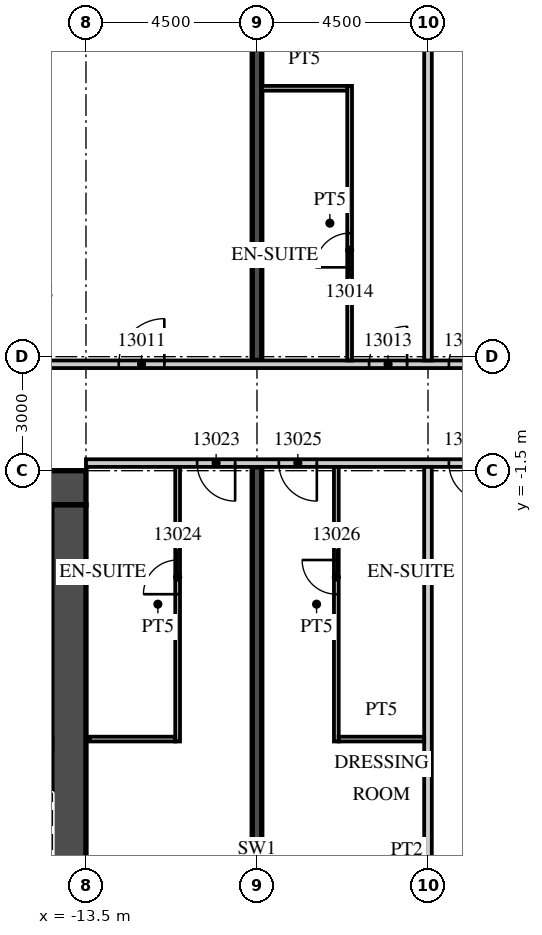
"""IFC4 building model, lengths in metres.
Left out: names, types, materials, properties, quantities, classifications, styles, units other than length and angle.
Written with IfcOpenShell. Run it as: python <this file> out.ifc"""

import sys

from ifc_helpers import new_model, si_unit, direction, frame, frame_2d, origin, place, context, subcontext, project, spatial, rectangle, extrude, element, fill, save


model = new_model("IFC4")
c1 = context("Model", 3, precision=1e-05, world=origin(), true_north=direction((0.0, 1.0)))
c2 = subcontext(c1, "Body", "Model", "MODEL_VIEW")
j1 = project(units=[si_unit("LENGTHUNIT", "METRE"), si_unit("PLANEANGLEUNIT", "RADIAN")], contexts=[c1])
p1 = place(None, origin())
s1 = spatial("IfcSite", under=j1, at=p1, CompositionType="ELEMENT")
p2 = place(p1, origin())
s2 = spatial("IfcBuilding", under=s1, at=p2, CompositionType="ELEMENT")
p3 = place(p2, frame((0.0, 0.0, 73.2)))
s3 = spatial("IfcBuildingStorey", under=s2, at=p3, CompositionType="ELEMENT", Elevation=73.2)
for number, where, z_axis, x_axis in (
    (1, (-9.0, -21.54, 0.0), (0.0, 0.0, 1.0), (0.0, 1.0, 0.0)),
    (2, (-9.0, 1.4, 0.0), (0.0, 0.0, 1.0), (0.0, 1.0, 0.0)),
):
    element("IfcWall", number, at=place(p3, frame(where, z_axis=z_axis, x_axis=x_axis)), inside=s3, PredefinedType="SHEAR", context=c2, shape_type="SweptSolid", body=[
        extrude(rectangle(XDim=20.14, YDim=0.25, at=frame_2d((10.07, 0.0))), origin(), (0.0, 0.0, 1.0), 3.3),
    ])
p4 = place(p3, frame((-44.55, 1.3, 0.0), z_axis=(0.0, 0.0, 1.0), x_axis=(1.0, 0.0, 0.0)))
e3 = element("IfcWall", 3, at=p4, inside=s3, PredefinedType="PARTITIONING", context=c2, shape_type="SweptSolid", body=[
    extrude(rectangle(XDim=58.05, YDim=0.2, at=frame_2d((29.025, 0.0))), origin(), (0.0, 0.0, 1.0), 3.02),
])
p5 = place(p4, frame((0.525, 0.0, 0.0)))
e4 = element("IfcOpeningElement", 4, at=p5, cuts=e3, PredefinedType="OPENING", context=c2, shape_type="SweptSolid", body=[
    extrude(rectangle(XDim=1.0, YDim=2.1, at=frame_2d((0.5, 1.05))), frame((0.0, 0.11, 0.0), z_axis=(0.0, -1.0, 0.0), x_axis=(1.0, 0.0, 0.0)), (0.0, 0.0, 1.0), 0.22),
])
p6 = place(p4, frame((6.975, 0.0, 0.0)))
e5 = element("IfcOpeningElement", 5, at=p6, cuts=e3, PredefinedType="OPENING", context=c2, shape_type="SweptSolid", body=[
    extrude(rectangle(XDim=1.0, YDim=2.1, at=frame_2d((0.5, 1.05))), frame((0.0, 0.11, 0.0), z_axis=(0.0, -1.0, 0.0), x_axis=(1.0, 0.0, 0.0)), (0.0, 0.0, 1.0), 0.22),
])
p7 = place(p4, frame((9.125, 0.0, 0.0)))
e6 = element("IfcOpeningElement", 6, at=p7, cuts=e3, PredefinedType="OPENING", context=c2, shape_type="SweptSolid", body=[
    extrude(rectangle(XDim=1.0, YDim=2.1, at=frame_2d((0.5, 1.05))), frame((0.0, 0.11, 0.0), z_axis=(0.0, -1.0, 0.0), x_axis=(1.0, 0.0, 0.0)), (0.0, 0.0, 1.0), 0.22),
])
p8 = place(p4, frame((13.6, 0.0, 0.0)))
e7 = element("IfcOpeningElement", 7, at=p8, cuts=e3, PredefinedType="OPENING", context=c2, shape_type="SweptSolid", body=[
    extrude(rectangle(XDim=1.0, YDim=2.1, at=frame_2d((0.5, 1.05))), frame((0.0, 0.11, 0.0), z_axis=(0.0, -1.0, 0.0), x_axis=(1.0, 0.0, 0.0)), (0.0, 0.0, 1.0), 0.22),
])
p9 = place(p4, frame((19.987, 0.0, 0.0)))
e8 = element("IfcOpeningElement", 8, at=p9, cuts=e3, PredefinedType="OPENING", context=c2, shape_type="SweptSolid", body=[
    extrude(rectangle(XDim=1.2, YDim=2.1, at=frame_2d((0.6, 1.05))), frame((0.0, 0.11, 0.0), z_axis=(0.0, -1.0, 0.0), x_axis=(1.0, 0.0, 0.0)), (0.0, 0.0, 1.0), 0.22),
])
p10 = place(p4, frame((31.912, 0.0, 0.0)))
e9 = element("IfcOpeningElement", 9, at=p10, cuts=e3, PredefinedType="OPENING", context=c2, shape_type="SweptSolid", body=[
    extrude(rectangle(XDim=1.2, YDim=2.1, at=frame_2d((0.6, 1.05))), frame((0.0, 0.11, 0.0), z_axis=(0.0, -1.0, 0.0), x_axis=(1.0, 0.0, 0.0)), (0.0, 0.0, 1.0), 0.22),
])
p11 = place(p4, frame((38.5, 0.0, 0.0)))
e10 = element("IfcOpeningElement", 10, at=p11, cuts=e3, PredefinedType="OPENING", context=c2, shape_type="SweptSolid", body=[
    extrude(rectangle(XDim=1.0, YDim=2.1, at=frame_2d((0.5, 1.05))), frame((0.0, 0.11, 0.0), z_axis=(0.0, -1.0, 0.0), x_axis=(1.0, 0.0, 0.0)), (0.0, 0.0, 1.0), 0.22),
])
p12 = place(p4, frame((40.6, 0.0, 0.0)))
e11 = element("IfcOpeningElement", 11, at=p12, cuts=e3, PredefinedType="OPENING", context=c2, shape_type="SweptSolid", body=[
    extrude(rectangle(XDim=1.0, YDim=2.1, at=frame_2d((0.5, 1.05))), frame((0.0, 0.11, 0.0), z_axis=(0.0, -1.0, 0.0), x_axis=(1.0, 0.0, 0.0)), (0.0, 0.0, 1.0), 0.22),
])
p13 = place(p4, frame((47.5, 0.0, 0.0)))
e12 = element("IfcOpeningElement", 12, at=p13, cuts=e3, PredefinedType="OPENING", context=c2, shape_type="SweptSolid", body=[
    extrude(rectangle(XDim=1.0, YDim=2.1, at=frame_2d((0.5, 1.05))), frame((0.0, 0.11, 0.0), z_axis=(0.0, -1.0, 0.0), x_axis=(1.0, 0.0, 0.0)), (0.0, 0.0, 1.0), 0.22),
])
p14 = place(p4, frame((51.975, 0.0, 0.0)))
e13 = element("IfcOpeningElement", 13, at=p14, cuts=e3, PredefinedType="OPENING", context=c2, shape_type="SweptSolid", body=[
    extrude(rectangle(XDim=1.0, YDim=2.1, at=frame_2d((0.5, 1.05))), frame((0.0, 0.11, 0.0), z_axis=(0.0, -1.0, 0.0), x_axis=(1.0, 0.0, 0.0)), (0.0, 0.0, 1.0), 0.22),
])
p15 = place(p4, frame((56.475, 0.0, 0.0)))
e14 = element("IfcOpeningElement", 14, at=p15, cuts=e3, PredefinedType="OPENING", context=c2, shape_type="SweptSolid", body=[
    extrude(rectangle(XDim=1.0, YDim=2.1, at=frame_2d((0.5, 1.05))), frame((0.0, 0.11, 0.0), z_axis=(0.0, -1.0, 0.0), x_axis=(1.0, 0.0, 0.0)), (0.0, 0.0, 1.0), 0.22),
])
p16 = place(p3, frame((-4.5, 1.4, 0.0), z_axis=(0.0, 0.0, 1.0), x_axis=(0.0, 1.0, 0.0)))
e15 = element("IfcWall", 15, at=p16, inside=s3, PredefinedType="PARTITIONING", context=c2, shape_type="SweptSolid", body=[
    extrude(rectangle(XDim=20.15, YDim=0.2, at=frame_2d((10.075, 0.0))), origin(), (0.0, 0.0, 1.0), 3.02),
])
p17 = place(p3, frame((-6.562, 1.4, 0.0), z_axis=(0.0, 0.0, 1.0), x_axis=(0.0, 1.0, 0.0)))
e16 = element("IfcWall", 16, at=p17, inside=s3, PredefinedType="PARTITIONING", context=c2, shape_type="SweptSolid", body=[
    extrude(rectangle(XDim=7.225, YDim=0.125, at=frame_2d((3.613, 0.0))), origin(), (0.0, 0.0, 1.0), 3.02),
])
p18 = place(p17, frame((2.45, 0.0, 0.0)))
e17 = element("IfcOpeningElement", 17, at=p18, cuts=e16, PredefinedType="OPENING", context=c2, shape_type="SweptSolid", body=[
    extrude(rectangle(XDim=0.9, YDim=2.1, at=frame_2d((0.45, 1.05))), frame((0.0, 0.073, 0.0), z_axis=(0.0, -1.0, 0.0), x_axis=(1.0, 0.0, 0.0)), (0.0, 0.0, 1.0), 0.145),
])
p19 = place(p3, frame((-8.875, 8.562, 0.0), z_axis=(0.0, 0.0, 1.0), x_axis=(1.0, 0.0, 0.0)))
e18 = element("IfcWall", 18, at=p19, inside=s3, PredefinedType="PARTITIONING", context=c2, shape_type="SweptSolid", body=[
    extrude(rectangle(XDim=2.25, YDim=0.125, at=frame_2d((1.125, 0.0))), origin(), (0.0, 0.0, 1.0), 3.02),
])
p20 = place(p3, frame((-13.5, -1.3, 0.0), z_axis=(0.0, 0.0, 1.0), x_axis=(1.0, 0.0, 0.0)))
e19 = element("IfcWall", 19, at=p20, inside=s3, PredefinedType="PARTITIONING", context=c2, shape_type="SweptSolid", body=[
    extrude(rectangle(XDim=58.05, YDim=0.2, at=frame_2d((29.025, 0.0))), origin(), (0.0, 0.0, 1.0), 3.02),
])
p21 = place(p20, frame((2.925, 0.0, 0.0)))
e20 = element("IfcOpeningElement", 20, at=p21, cuts=e19, PredefinedType="OPENING", context=c2, shape_type="SweptSolid", body=[
    extrude(rectangle(XDim=1.0, YDim=2.1, at=frame_2d((0.5, 1.05))), frame((0.0, 0.11, 0.0), z_axis=(0.0, -1.0, 0.0), x_axis=(1.0, 0.0, 0.0)), (0.0, 0.0, 1.0), 0.22),
])
p22 = place(p20, frame((5.075, 0.0, 0.0)))
e21 = element("IfcOpeningElement", 21, at=p22, cuts=e19, PredefinedType="OPENING", context=c2, shape_type="SweptSolid", body=[
    extrude(rectangle(XDim=1.0, YDim=2.1, at=frame_2d((0.5, 1.05))), frame((0.0, 0.11, 0.0), z_axis=(0.0, -1.0, 0.0), x_axis=(1.0, 0.0, 0.0)), (0.0, 0.0, 1.0), 0.22),
])
p23 = place(p20, frame((9.55, 0.0, 0.0)))
e22 = element("IfcOpeningElement", 22, at=p23, cuts=e19, PredefinedType="OPENING", context=c2, shape_type="SweptSolid", body=[
    extrude(rectangle(XDim=1.0, YDim=2.1, at=frame_2d((0.5, 1.05))), frame((0.0, 0.11, 0.0), z_axis=(0.0, -1.0, 0.0), x_axis=(1.0, 0.0, 0.0)), (0.0, 0.0, 1.0), 0.22),
])
p24 = place(p20, frame((18.862, 0.0, 0.0)))
e23 = element("IfcOpeningElement", 23, at=p24, cuts=e19, PredefinedType="OPENING", context=c2, shape_type="SweptSolid", body=[
    extrude(rectangle(XDim=1.2, YDim=2.1, at=frame_2d((0.6, 1.05))), frame((0.0, 0.11, 0.0), z_axis=(0.0, -1.0, 0.0), x_axis=(1.0, 0.0, 0.0)), (0.0, 0.0, 1.0), 0.22),
])
p25 = place(p20, frame((27.862, 0.0, 0.0)))
e24 = element("IfcOpeningElement", 24, at=p25, cuts=e19, PredefinedType="OPENING", context=c2, shape_type="SweptSolid", body=[
    extrude(rectangle(XDim=1.2, YDim=2.1, at=frame_2d((0.6, 1.05))), frame((0.0, 0.11, 0.0), z_axis=(0.0, -1.0, 0.0), x_axis=(1.0, 0.0, 0.0)), (0.0, 0.0, 1.0), 0.22),
])
p26 = place(p20, frame((34.45, 0.0, 0.0)))
e25 = element("IfcOpeningElement", 25, at=p26, cuts=e19, PredefinedType="OPENING", context=c2, shape_type="SweptSolid", body=[
    extrude(rectangle(XDim=1.0, YDim=2.1, at=frame_2d((0.5, 1.05))), frame((0.0, 0.11, 0.0), z_axis=(0.0, -1.0, 0.0), x_axis=(1.0, 0.0, 0.0)), (0.0, 0.0, 1.0), 0.22),
])
p27 = place(p20, frame((38.925, 0.0, 0.0)))
e26 = element("IfcOpeningElement", 26, at=p27, cuts=e19, PredefinedType="OPENING", context=c2, shape_type="SweptSolid", body=[
    extrude(rectangle(XDim=1.0, YDim=2.1, at=frame_2d((0.5, 1.05))), frame((0.0, 0.11, 0.0), z_axis=(0.0, -1.0, 0.0), x_axis=(1.0, 0.0, 0.0)), (0.0, 0.0, 1.0), 0.22),
])
p28 = place(p20, frame((45.862, 0.0, 0.0)))
e27 = element("IfcOpeningElement", 27, at=p28, cuts=e19, PredefinedType="OPENING", context=c2, shape_type="SweptSolid", body=[
    extrude(rectangle(XDim=1.2, YDim=2.1, at=frame_2d((0.6, 1.05))), frame((0.0, 0.11, 0.0), z_axis=(0.0, -1.0, 0.0), x_axis=(1.0, 0.0, 0.0)), (0.0, 0.0, 1.0), 0.22),
])
p29 = place(p20, frame((50.075, 0.0, 0.0)))
e28 = element("IfcOpeningElement", 28, at=p29, cuts=e19, PredefinedType="OPENING", context=c2, shape_type="SweptSolid", body=[
    extrude(rectangle(XDim=1.0, YDim=2.1, at=frame_2d((0.5, 1.05))), frame((0.0, 0.11, 0.0), z_axis=(0.0, -1.0, 0.0), x_axis=(1.0, 0.0, 0.0)), (0.0, 0.0, 1.0), 0.22),
])
p30 = place(p20, frame((56.525, 0.0, 0.0)))
e29 = element("IfcOpeningElement", 29, at=p30, cuts=e19, PredefinedType="OPENING", context=c2, shape_type="SweptSolid", body=[
    extrude(rectangle(XDim=1.0, YDim=2.1, at=frame_2d((0.5, 1.05))), frame((0.0, 0.11, 0.0), z_axis=(0.0, -1.0, 0.0), x_axis=(1.0, 0.0, 0.0)), (0.0, 0.0, 1.0), 0.22),
])
p31 = place(p3, frame((-11.088, -8.625, 0.0), z_axis=(0.0, 0.0, 1.0), x_axis=(0.0, 1.0, 0.0)))
e30 = element("IfcWall", 30, at=p31, inside=s3, PredefinedType="PARTITIONING", context=c2, shape_type="SweptSolid", body=[
    extrude(rectangle(XDim=7.225, YDim=0.125, at=frame_2d((3.613, 0.0))), origin(), (0.0, 0.0, 1.0), 3.02),
])
p32 = place(p31, frame((3.875, 0.0, 0.0)))
e31 = element("IfcOpeningElement", 31, at=p32, cuts=e30, PredefinedType="OPENING", context=c2, shape_type="SweptSolid", body=[
    extrude(rectangle(XDim=0.9, YDim=2.1, at=frame_2d((0.45, 1.05))), frame((0.0, 0.073, 0.0), z_axis=(0.0, -1.0, 0.0), x_axis=(1.0, 0.0, 0.0)), (0.0, 0.0, 1.0), 0.145),
])
p33 = place(p3, frame((-13.4, -8.562, 0.0), z_axis=(0.0, 0.0, 1.0), x_axis=(1.0, 0.0, 0.0)))
e32 = element("IfcWall", 32, at=p33, inside=s3, PredefinedType="PARTITIONING", context=c2, shape_type="SweptSolid", body=[
    extrude(rectangle(XDim=2.25, YDim=0.125, at=frame_2d((1.125, 0.0))), origin(), (0.0, 0.0, 1.0), 3.02),
])
p34 = place(p3, frame((-4.5, -21.55, 0.0), z_axis=(0.0, 0.0, 1.0), x_axis=(0.0, 1.0, 0.0)))
e33 = element("IfcWall", 33, at=p34, inside=s3, PredefinedType="PARTITIONING", context=c2, shape_type="SweptSolid", body=[
    extrude(rectangle(XDim=20.15, YDim=0.2, at=frame_2d((10.075, 0.0))), origin(), (0.0, 0.0, 1.0), 3.02),
])
p35 = place(p3, frame((-6.912, -8.625, 0.0), z_axis=(0.0, 0.0, 1.0), x_axis=(0.0, 1.0, 0.0)))
e34 = element("IfcWall", 34, at=p35, inside=s3, PredefinedType="PARTITIONING", context=c2, shape_type="SweptSolid", body=[
    extrude(rectangle(XDim=7.225, YDim=0.125, at=frame_2d((3.613, 0.0))), origin(), (0.0, 0.0, 1.0), 3.02),
])
p36 = place(p35, frame((3.875, 0.0, 0.0)))
e35 = element("IfcOpeningElement", 35, at=p36, cuts=e34, PredefinedType="OPENING", context=c2, shape_type="SweptSolid", body=[
    extrude(rectangle(XDim=0.9, YDim=2.1, at=frame_2d((0.45, 1.05))), frame((0.0, 0.073, 0.0), z_axis=(0.0, -1.0, 0.0), x_axis=(1.0, 0.0, 0.0)), (0.0, 0.0, 1.0), 0.145),
])
p37 = place(p3, frame((-6.85, -8.562, 0.0), z_axis=(0.0, 0.0, 1.0), x_axis=(1.0, 0.0, 0.0)))
e36 = element("IfcWall", 36, at=p37, inside=s3, PredefinedType="PARTITIONING", context=c2, shape_type="SweptSolid", body=[
    extrude(rectangle(XDim=2.25, YDim=0.125, at=frame_2d((1.125, 0.0))), origin(), (0.0, 0.0, 1.0), 3.02),
])
p38 = place(p3, frame((-31.5, -1.95, 0.0), z_axis=(0.0, 0.0, 1.0), x_axis=(1.0, 0.0, 0.0)))
e37 = element("IfcWall", 37, at=p38, inside=s3, PredefinedType="SHEAR", context=c2, shape_type="SweptSolid", body=[
    extrude(rectangle(XDim=18.0, YDim=0.9, at=frame_2d((9.0, 0.0))), origin(), (0.0, 0.0, 1.0), 3.02),
])
p39 = place(p38, frame((14.725, 0.0, 0.0)))
e38 = element("IfcOpeningElement", 38, at=p39, cuts=e37, PredefinedType="OPENING", context=c2, shape_type="SweptSolid", body=[
    extrude(rectangle(XDim=1.8, YDim=2.1, at=frame_2d((0.9, 1.05))), frame((0.0, 0.46, 0.0), z_axis=(0.0, -1.0, 0.0), x_axis=(1.0, 0.0, 0.0)), (0.0, 0.0, 1.0), 0.92),
])
p40 = place(p3, frame((-13.95, -14.6, 0.0), z_axis=(0.0, 0.0, 1.0), x_axis=(0.0, 1.0, 0.0)))
e39 = element("IfcWall", 39, at=p40, inside=s3, PredefinedType="SHEAR", context=c2, shape_type="SweptSolid", body=[
    extrude(rectangle(XDim=12.2, YDim=0.9, at=frame_2d((6.1, 0.0))), origin(), (0.0, 0.0, 1.0), 3.02),
])
p41 = place(p10, origin())
e40 = element("IfcDoor", 40, at=p41, inside=s3, OperationType="SINGLE_SWING_RIGHT", PredefinedType="DOOR", context=c2, shape_type="SweptSolid", body=[
    extrude(rectangle(XDim=1.2, YDim=2.1, at=frame_2d((0.6, 1.05))), frame((0.0, 0.025, 0.0), z_axis=(0.0, -1.0, 0.0), x_axis=(1.0, 0.0, 0.0)), (0.0, 0.0, 1.0), 0.05),
])
fill(e9, e40)
p42 = place(p11, origin())
e41 = element("IfcDoor", 41, at=p42, inside=s3, OperationType="SINGLE_SWING_RIGHT", PredefinedType="DOOR", context=c2, shape_type="SweptSolid", body=[
    extrude(rectangle(XDim=1.0, YDim=2.1, at=frame_2d((0.5, 1.05))), frame((0.0, 0.025, 0.0), z_axis=(0.0, -1.0, 0.0), x_axis=(1.0, 0.0, 0.0)), (0.0, 0.0, 1.0), 0.05),
])
fill(e10, e41)
p43 = place(p18, origin())
e42 = element("IfcDoor", 42, at=p43, inside=s3, OperationType="SINGLE_SWING_LEFT", PredefinedType="DOOR", context=c2, shape_type="SweptSolid", body=[
    extrude(rectangle(XDim=0.9, YDim=2.1, at=frame_2d((0.45, 1.05))), frame((0.0, 0.025, 0.0), z_axis=(0.0, -1.0, 0.0), x_axis=(1.0, 0.0, 0.0)), (0.0, 0.0, 1.0), 0.05),
])
fill(e17, e42)
p44 = place(p12, origin())
e43 = element("IfcDoor", 43, at=p44, inside=s3, OperationType="SINGLE_SWING_RIGHT", PredefinedType="DOOR", context=c2, shape_type="SweptSolid", body=[
    extrude(rectangle(XDim=1.0, YDim=2.1, at=frame_2d((0.5, 1.05))), frame((0.0, 0.025, 0.0), z_axis=(0.0, -1.0, 0.0), x_axis=(1.0, 0.0, 0.0)), (0.0, 0.0, 1.0), 0.05),
])
fill(e11, e43)
p45 = place(p21, origin())
e44 = element("IfcDoor", 44, at=p45, inside=s3, OperationType="SINGLE_SWING_RIGHT", PredefinedType="DOOR", context=c2, shape_type="SweptSolid", body=[
    extrude(rectangle(XDim=1.0, YDim=2.1, at=frame_2d((0.5, 1.05))), frame((0.0, 0.025, 0.0), z_axis=(0.0, -1.0, 0.0), x_axis=(1.0, 0.0, 0.0)), (0.0, 0.0, 1.0), 0.05),
])
fill(e20, e44)
p46 = place(p32, origin())
e45 = element("IfcDoor", 45, at=p46, inside=s3, OperationType="SINGLE_SWING_LEFT", PredefinedType="DOOR", context=c2, shape_type="SweptSolid", body=[
    extrude(rectangle(XDim=0.9, YDim=2.1, at=frame_2d((0.45, 1.05))), frame((0.0, 0.025, 0.0), z_axis=(0.0, -1.0, 0.0), x_axis=(1.0, 0.0, 0.0)), (0.0, 0.0, 1.0), 0.05),
])
fill(e31, e45)
p47 = place(p22, origin())
e46 = element("IfcDoor", 46, at=p47, inside=s3, OperationType="SINGLE_SWING_RIGHT", PredefinedType="DOOR", context=c2, shape_type="SweptSolid", body=[
    extrude(rectangle(XDim=1.0, YDim=2.1, at=frame_2d((0.5, 1.05))), frame((0.0, 0.025, 0.0), z_axis=(0.0, -1.0, 0.0), x_axis=(1.0, 0.0, 0.0)), (0.0, 0.0, 1.0), 0.05),
])
fill(e21, e46)
p48 = place(p36, origin())
e47 = element("IfcDoor", 47, at=p48, inside=s3, OperationType="SINGLE_SWING_RIGHT", PredefinedType="DOOR", context=c2, shape_type="SweptSolid", body=[
    extrude(rectangle(XDim=0.9, YDim=2.1, at=frame_2d((0.45, 1.05))), frame((0.0, 0.025, 0.0), z_axis=(0.0, -1.0, 0.0), x_axis=(1.0, 0.0, 0.0)), (0.0, 0.0, 1.0), 0.05),
])
fill(e35, e47)
p49 = place(p23, origin())
e48 = element("IfcDoor", 48, at=p49, inside=s3, OperationType="SINGLE_SWING_RIGHT", PredefinedType="DOOR", context=c2, shape_type="SweptSolid", body=[
    extrude(rectangle(XDim=1.0, YDim=2.1, at=frame_2d((0.5, 1.05))), frame((0.0, 0.025, 0.0), z_axis=(0.0, -1.0, 0.0), x_axis=(1.0, 0.0, 0.0)), (0.0, 0.0, 1.0), 0.05),
])
fill(e22, e48)
save(model, sys.argv[1])
